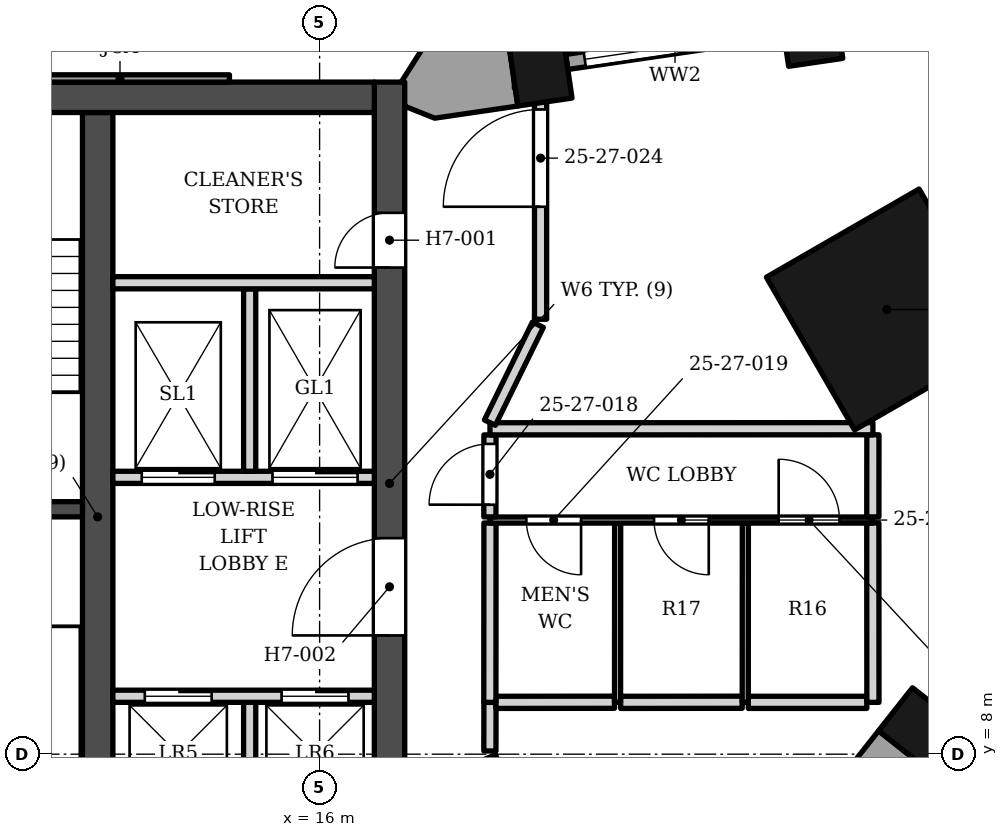
"""IFC4 building model, lengths in metres.
Left out: names, types, materials, properties, quantities, classifications, styles, units other than length and angle.
Written with IfcOpenShell. Run it as: python <this file> out.ifc"""

import sys

from ifc_helpers import new_model, si_unit, direction, frame, frame_2d, origin, origin_2d, place, context, subcontext, project, spatial, polyline, rectangle, outline, extrude, element, fill, save


model = new_model("IFC4")
c1 = context("Model", 3, precision=1e-05, world=origin(), true_north=direction((0.0, 1.0)))
c2 = subcontext(c1, "Body", "Model", "MODEL_VIEW")
j1 = project(units=[si_unit("LENGTHUNIT", "METRE"), si_unit("PLANEANGLEUNIT", "RADIAN")], contexts=[c1])
p1 = place(None, origin())
s1 = spatial("IfcSite", under=j1, at=p1, CompositionType="ELEMENT")
p2 = place(p1, origin())
s2 = spatial("IfcBuilding", under=s1, at=p2, CompositionType="ELEMENT")
p3 = place(p2, frame((0.0, 0.0, 112.2)))
s3 = spatial("IfcBuildingStorey", under=s2, at=p3, CompositionType="ELEMENT", Elevation=112.2)
p4 = place(p3, frame((-16.9, 18.802, 0.0), z_axis=(0.0, 0.0, 1.0), x_axis=(1.0, 0.0, 0.0)))
e1 = element("IfcWall", 1, at=p4, inside=s3, PredefinedType="SHEAR", context=c2, shape_type="SweptSolid", body=[
    extrude(rectangle(XDim=33.8, YDim=0.5, at=frame_2d((16.9, 0.0))), origin(), (0.0, 0.0, 1.0), 3.4),
])
p5 = place(p3, frame((12.35, 5.253, 0.0), z_axis=(0.0, 0.0, 1.0), x_axis=(0.0, 1.0, 0.0)))
e2 = element("IfcWall", 2, at=p5, inside=s3, PredefinedType="SHEAR", context=c2, shape_type="SweptSolid", body=[
    extrude(rectangle(XDim=13.3, YDim=0.5, at=frame_2d((6.65, 0.0))), origin(), (0.0, 0.0, 1.0), 3.4),
])
p6 = place(p3, frame((8.35, 12.028, 0.0), z_axis=(0.0, 0.0, 1.0), x_axis=(1.0, 0.0, 0.0)))
e3 = element("IfcWall", 3, at=p6, inside=s3, PredefinedType="SHEAR", context=c2, shape_type="SweptSolid", body=[
    extrude(rectangle(XDim=3.75, YDim=0.25, at=frame_2d((1.875, 0.0))), origin(), (0.0, 0.0, 1.0), 3.4),
])
p7 = place(p3, frame((17.15, 5.853, 0.0), z_axis=(0.0, 0.0, 1.0), x_axis=(0.0, 1.0, 0.0)))
e4 = element("IfcWall", 4, at=p7, inside=s3, PredefinedType="SHEAR", context=c2, shape_type="SweptSolid", body=[
    extrude(rectangle(XDim=13.2, YDim=0.5, at=frame_2d((6.6, 0.0))), origin(), (0.0, 0.0, 1.0), 3.4),
])
p8 = place(p7, frame((4.1, 0.0, 0.0)))
e5 = element("IfcOpeningElement", 5, at=p8, cuts=e4, PredefinedType="OPENING", context=c2, shape_type="SweptSolid", body=[
    extrude(rectangle(XDim=1.6, YDim=2.1, at=frame_2d((0.8, 1.05))), frame((0.0, 0.26, 0.0), z_axis=(0.0, -1.0, 0.0), x_axis=(1.0, 0.0, 0.0)), (0.0, 0.0, 1.0), 0.52),
])
p9 = place(p7, frame((10.15, 0.0, 0.0)))
e6 = element("IfcOpeningElement", 6, at=p9, cuts=e4, PredefinedType="OPENING", context=c2, shape_type="SweptSolid", body=[
    extrude(rectangle(XDim=0.9, YDim=2.1, at=frame_2d((0.45, 1.05))), frame((0.0, 0.26, 0.0), z_axis=(0.0, -1.0, 0.0), x_axis=(1.0, 0.0, 0.0)), (0.0, 0.0, 1.0), 0.52),
])
p10 = place(p3, frame((25.329, 15.313, 0.0), z_axis=(0.0, 0.0, 1.0), x_axis=(-0.866025377604, -0.500000045345, 0.0)))
e7 = element("IfcColumn", 7, at=p10, inside=s3, PredefinedType="COLUMN", context=c2, shape_type="SweptSolid", body=[
    extrude(rectangle(XDim=2.9, YDim=2.9, at=origin_2d()), origin(), (0.0, 0.0, 1.0), 3.4),
])
for number, where, z_axis, x_axis in (
    (8, (25.943, 8.367, 0.0), (0.0, 0.0, 1.0), (0.62, 0.784, 0.0)),
    (9, (24.072, 19.971, 0.0), (0.0, 0.0, 1.0), (-0.989, -0.145, 0.0)),
    (10, (19.619, 19.318, 0.0), (0.0, 0.0, 1.0), (-0.989, -0.145, 0.0)),
):
    element("IfcColumn", number, at=place(p3, frame(where, z_axis=z_axis, x_axis=x_axis)), inside=s3, PredefinedType="COLUMN", context=c2, shape_type="SweptSolid", body=[
        extrude(rectangle(XDim=0.9, YDim=1.2, at=origin_2d()), origin(), (0.0, 0.0, 1.0), 3.4),
    ])
p11 = place(p3, origin())
e11 = element("IfcWall", 11, at=p11, inside=s3, PredefinedType="SOLIDWALL", context=c2, shape_type="SweptSolid", body=[
    extrude(outline(polyline([(10.917, 19.173), (10.917, 19.052), (14.517, 19.052), (14.517, 19.173), (10.917, 19.173)])), origin(), (0.0, 0.0, 1.0), 2.65),
])
p12 = place(p3, frame((23.626, 19.906, 0.0), z_axis=(0.0, 0.0, 1.0), x_axis=(-0.989431656237, -0.144999991846, 0.0)))
e12 = element("IfcWall", 12, at=p12, inside=s3, PredefinedType="ELEMENTEDWALL", context=c2, shape_type="SweptSolid", body=[
    extrude(rectangle(XDim=3.6, YDim=0.25, at=frame_2d((1.8, 0.0))), origin(), (0.0, 0.0, 1.0), 2.552),
])
p13 = place(p12, frame((0.3, 0.0, 0.3)))
e13 = element("IfcOpeningElement", 13, at=p13, cuts=e12, PredefinedType="OPENING", context=c2, shape_type="SweptSolid", body=[
    extrude(rectangle(XDim=3.0, YDim=2.05, at=frame_2d((1.5, 1.025))), frame((0.0, 0.135, 0.0), z_axis=(0.0, -1.0, 0.0), x_axis=(1.0, 0.0, 0.0)), (0.0, 0.0, 1.0), 0.27),
])
p14 = place(p3, origin())
e14 = element("IfcWall", 14, at=p14, inside=s3, PredefinedType="SOLIDWALL", context=c2, shape_type="SweptSolid", body=[
    extrude(outline(polyline([(25.193, 8.384), (24.336, 7.3), (24.807, 6.928), (25.326, 6.628), (25.304, 6.59), (26.135, 7.64), (25.193, 8.384)])), origin(), (0.0, 0.0, 1.0), 2.63),
])
p15 = place(p3, origin())
e15 = element("IfcWall", 15, at=p15, inside=s3, PredefinedType="SOLIDWALL", context=c2, shape_type="SweptSolid", body=[
    extrude(outline(polyline([(17.72, 19.646), (17.342, 19.052), (17.4, 19.052), (17.4, 18.656), (17.894, 18.459), (19.261, 18.659), (19.087, 19.847), (17.72, 19.646)])), origin(), (0.0, 0.0, 1.0), 2.65),
])
p16 = place(p3, frame((14.85, 6.353, 0.0), z_axis=(0.0, 0.0, 1.0), x_axis=(0.0, 1.0, 0.0)))
e16 = element("IfcWall", 16, at=p16, inside=s3, PredefinedType="SOLIDWALL", context=c2, shape_type="SweptSolid", body=[
    extrude(rectangle(XDim=2.5, YDim=0.2, at=frame_2d((1.25, 0.0))), origin(), (0.0, 0.0, 1.0), 3.23),
])
p17 = place(p3, frame((12.6, 8.953, 0.0), z_axis=(0.0, 0.0, 1.0), x_axis=(1.0, 0.0, 0.0)))
e17 = element("IfcWall", 17, at=p17, inside=s3, PredefinedType="SOLIDWALL", context=c2, shape_type="SweptSolid", body=[
    extrude(rectangle(XDim=4.3, YDim=0.2, at=frame_2d((2.15, 0.0))), origin(), (0.0, 0.0, 1.0), 3.23),
])
p18 = place(p17, frame((0.525, 0.0, 0.0)))
e18 = element("IfcOpeningElement", 18, at=p18, cuts=e17, PredefinedType="OPENING", context=c2, shape_type="SweptSolid", body=[
    extrude(rectangle(XDim=1.1, YDim=2.1, at=frame_2d((0.55, 1.05))), frame((0.0, 0.11, 0.0), z_axis=(0.0, -1.0, 0.0), x_axis=(1.0, 0.0, 0.0)), (0.0, 0.0, 1.0), 0.22),
])
p19 = place(p17, frame((2.775, 0.0, 0.0)))
e19 = element("IfcOpeningElement", 19, at=p19, cuts=e17, PredefinedType="OPENING", context=c2, shape_type="SweptSolid", body=[
    extrude(rectangle(XDim=1.1, YDim=2.1, at=frame_2d((0.55, 1.05))), frame((0.0, 0.11, 0.0), z_axis=(0.0, -1.0, 0.0), x_axis=(1.0, 0.0, 0.0)), (0.0, 0.0, 1.0), 0.22),
])
p20 = place(p3, frame((12.6, 12.552, 0.0), z_axis=(0.0, 0.0, 1.0), x_axis=(1.0, 0.0, 0.0)))
e20 = element("IfcWall", 20, at=p20, inside=s3, PredefinedType="SOLIDWALL", context=c2, shape_type="SweptSolid", body=[
    extrude(rectangle(XDim=4.3, YDim=0.2, at=frame_2d((2.15, 0.0))), origin(), (0.0, 0.0, 1.0), 3.23),
])
p21 = place(p20, frame((0.475, 0.0, 0.0)))
e21 = element("IfcOpeningElement", 21, at=p21, cuts=e20, PredefinedType="OPENING", context=c2, shape_type="SweptSolid", body=[
    extrude(rectangle(XDim=1.2, YDim=2.1, at=frame_2d((0.6, 1.05))), frame((0.0, 0.11, 0.0), z_axis=(0.0, -1.0, 0.0), x_axis=(1.0, 0.0, 0.0)), (0.0, 0.0, 1.0), 0.22),
])
p22 = place(p20, frame((2.625, 0.0, 0.0)))
e22 = element("IfcOpeningElement", 22, at=p22, cuts=e20, PredefinedType="OPENING", context=c2, shape_type="SweptSolid", body=[
    extrude(rectangle(XDim=1.4, YDim=2.1, at=frame_2d((0.7, 1.05))), frame((0.0, 0.11, 0.0), z_axis=(0.0, -1.0, 0.0), x_axis=(1.0, 0.0, 0.0)), (0.0, 0.0, 1.0), 0.22),
])
p23 = place(p3, frame((14.85, 12.653, 0.0), z_axis=(0.0, 0.0, 1.0), x_axis=(0.0, 1.0, 0.0)))
e23 = element("IfcWall", 23, at=p23, inside=s3, PredefinedType="SOLIDWALL", context=c2, shape_type="SweptSolid", body=[
    extrude(rectangle(XDim=3.0, YDim=0.2, at=frame_2d((1.5, 0.0))), origin(), (0.0, 0.0, 1.0), 3.23),
])
p24 = place(p3, frame((12.6, 15.753, 0.0), z_axis=(0.0, 0.0, 1.0), x_axis=(1.0, 0.0, 0.0)))
e24 = element("IfcWall", 24, at=p24, inside=s3, PredefinedType="SOLIDWALL", context=c2, shape_type="SweptSolid", body=[
    extrude(rectangle(XDim=4.3, YDim=0.2, at=frame_2d((2.15, 0.0))), origin(), (0.0, 0.0, 1.0), 3.23),
])
p25 = place(p3, frame((18.801, 7.953, 0.0), z_axis=(0.0, 0.0, 1.0), x_axis=(0.381856038323, -0.924221816447, 0.0)))
e25 = element("IfcWall", 25, at=p25, inside=s3, PredefinedType="PARTITIONING", context=c2, shape_type="SweptSolid", body=[
    extrude(rectangle(XDim=1.088, YDim=0.2, at=frame_2d((0.544, 0.0))), origin(), (0.0, 0.0, 1.0), 3.23),
])
p26 = place(p3, frame((18.801, 8.053, 0.0), z_axis=(0.0, 0.0, 1.0), x_axis=(0.001527182092, 0.999998833857, 0.0)))
e26 = element("IfcWall", 26, at=p26, inside=s3, PredefinedType="PARTITIONING", context=c2, shape_type="SweptSolid", body=[
    extrude(rectangle(XDim=0.799, YDim=0.2, at=frame_2d((0.4, 0.0))), origin(), (0.0, 0.0, 1.0), 3.23),
])
p27 = place(p3, frame((18.9, 8.852, 0.0), z_axis=(0.0, 0.0, 1.0), x_axis=(0.999999615941, 0.000876423853, 0.0)))
e27 = element("IfcWall", 27, at=p27, inside=s3, PredefinedType="PARTITIONING", context=c2, shape_type="SweptSolid", body=[
    extrude(rectangle(XDim=1.95, YDim=0.2, at=frame_2d((0.975, 0.0))), origin(), (0.0, 0.0, 1.0), 3.23),
])
p28 = place(p3, frame((20.95, 8.852, 0.0), z_axis=(0.0, 0.0, 1.0), x_axis=(0.999999634833, 0.000854596196, 0.0)))
e28 = element("IfcWall", 28, at=p28, inside=s3, PredefinedType="PARTITIONING", context=c2, shape_type="SweptSolid", body=[
    extrude(rectangle(XDim=2.0, YDim=0.2, at=frame_2d((1.0, 0.0))), origin(), (0.0, 0.0, 1.0), 3.23),
])
p29 = place(p3, frame((23.05, 8.852, 0.0), z_axis=(0.0, 0.0, 1.0), x_axis=(1.0, 0.0, 0.0)))
e29 = element("IfcWall", 29, at=p29, inside=s3, PredefinedType="PARTITIONING", context=c2, shape_type="SweptSolid", body=[
    extrude(rectangle(XDim=1.95, YDim=0.2, at=frame_2d((0.975, 0.0))), origin(), (0.0, 0.0, 1.0), 3.23),
])
for number, where, z_axis, x_axis in (
    (30, (25.098, 11.802, 0.0), (0.0, 0.0, 1.0), (0.001, -1.0, 0.0)),
    (31, (18.8, 8.852, 0.0), (0.0, 0.0, 1.0), (0.001, 1.0, 0.0)),
):
    element("IfcWall", number, at=place(p3, frame(where, z_axis=z_axis, x_axis=x_axis)), inside=s3, PredefinedType="PARTITIONING", context=c2, shape_type="SweptSolid", body=[
        extrude(rectangle(XDim=2.95, YDim=0.2, at=frame_2d((1.475, 0.0))), origin(), (0.0, 0.0, 1.0), 3.23),
    ])
for number, where, z_axis, x_axis in (
    (32, (20.9, 8.852, 0.0), (0.0, 0.0, 1.0), (0.001, 1.0, 0.0)),
    (33, (23.0, 8.852, 0.0), (0.0, 0.0, 1.0), (0.001, 1.0, 0.0)),
):
    element("IfcWall", number, at=place(p3, frame(where, z_axis=z_axis, x_axis=x_axis)), inside=s3, PredefinedType="PARTITIONING", context=c2, shape_type="SweptSolid", body=[
        extrude(rectangle(XDim=2.948, YDim=0.1, at=frame_2d((1.474, 0.0))), origin(), (0.0, 0.0, 1.0), 3.23),
    ])
p30 = place(p3, frame((18.8, 11.85, 0.0), z_axis=(0.0, 0.0, 1.0), x_axis=(1.0, 0.0, 0.0)))
e34 = element("IfcWall", 34, at=p30, inside=s3, PredefinedType="PARTITIONING", context=c2, shape_type="SweptSolid", body=[
    extrude(rectangle(XDim=6.3, YDim=0.1, at=frame_2d((3.15, 0.0))), origin(), (0.0, 0.0, 1.0), 2.552),
])
p31 = place(p30, frame((0.6, 0.0, 0.0)))
e35 = element("IfcOpeningElement", 35, at=p31, cuts=e34, PredefinedType="OPENING", context=c2, shape_type="SweptSolid", body=[
    extrude(rectangle(XDim=0.9, YDim=2.1, at=frame_2d((0.45, 1.05))), frame((0.0, 0.06, 0.0), z_axis=(0.0, -1.0, 0.0), x_axis=(1.0, 0.0, 0.0)), (0.0, 0.0, 1.0), 0.12),
])
p32 = place(p30, frame((2.7, 0.0, 0.0)))
e36 = element("IfcOpeningElement", 36, at=p32, cuts=e34, PredefinedType="OPENING", context=c2, shape_type="SweptSolid", body=[
    extrude(rectangle(XDim=0.9, YDim=2.1, at=frame_2d((0.45, 1.05))), frame((0.0, 0.06, 0.0), z_axis=(0.0, -1.0, 0.0), x_axis=(1.0, 0.0, 0.0)), (0.0, 0.0, 1.0), 0.12),
])
p33 = place(p30, frame((4.75, 0.0, 0.0)))
e37 = element("IfcOpeningElement", 37, at=p33, cuts=e34, PredefinedType="OPENING", context=c2, shape_type="SweptSolid", body=[
    extrude(rectangle(XDim=1.0, YDim=2.1, at=frame_2d((0.5, 1.05))), frame((0.0, 0.06, 0.0), z_axis=(0.0, -1.0, 0.0), x_axis=(1.0, 0.0, 0.0)), (0.0, 0.0, 1.0), 0.12),
])
p34 = place(p3, frame((25.098, 11.902, 0.0), z_axis=(0.0, 0.0, 1.0), x_axis=(0.001085186556, 0.999999411185, 0.0)))
e38 = element("IfcWall", 38, at=p34, inside=s3, PredefinedType="PARTITIONING", context=c2, shape_type="SweptSolid", body=[
    extrude(rectangle(XDim=1.35, YDim=0.2, at=frame_2d((0.675, 0.0))), origin(), (0.0, 0.0, 1.0), 3.23),
])
p35 = place(p3, frame((18.8, 11.902, 0.0), z_axis=(0.0, 0.0, 1.0), x_axis=(0.001267655628, 0.999999196524, 0.0)))
e39 = element("IfcWall", 39, at=p35, inside=s3, PredefinedType="PARTITIONING", context=c2, shape_type="SweptSolid", body=[
    extrude(rectangle(XDim=1.348, YDim=0.2, at=frame_2d((0.674, 0.0))), origin(), (0.0, 0.0, 1.0), 3.23),
])
p36 = place(p35, frame((0.2, 0.0, 0.0)))
e40 = element("IfcOpeningElement", 40, at=p36, cuts=e39, PredefinedType="OPENING", context=c2, shape_type="SweptSolid", body=[
    extrude(rectangle(XDim=1.0, YDim=2.1, at=frame_2d((0.5, 1.05))), frame((0.0, 0.11, 0.0), z_axis=(0.0, -1.0, 0.0), x_axis=(1.0, 0.0, 0.0)), (0.0, 0.0, 1.0), 0.22),
])
p37 = place(p3, frame((18.802, 13.351, 0.0), z_axis=(0.0, 0.0, 1.0), x_axis=(0.999999963185, 0.000271349372, 0.0)))
e41 = element("IfcWall", 41, at=p37, inside=s3, PredefinedType="PARTITIONING", context=c2, shape_type="SweptSolid", body=[
    extrude(rectangle(XDim=6.298, YDim=0.2, at=frame_2d((3.149, 0.0))), origin(), (0.0, 0.0, 1.0), 3.23),
])
p38 = place(p3, frame((18.801, 13.452, 0.0), z_axis=(0.0, 0.0, 1.0), x_axis=(0.440230384159, 0.897884852786, 0.0)))
e42 = element("IfcWall", 42, at=p38, inside=s3, PredefinedType="PARTITIONING", context=c2, shape_type="SweptSolid", body=[
    extrude(rectangle(XDim=1.793, YDim=0.2, at=frame_2d((0.897, 0.0))), origin(), (0.0, 0.0, 1.0), 3.23),
])
p39 = place(p3, frame((19.634, 15.153, 0.0), z_axis=(0.0, 0.0, 1.0), x_axis=(0.0, 1.0, 0.0)))
e43 = element("IfcWall", 43, at=p39, inside=s3, PredefinedType="PARTITIONING", context=c2, shape_type="SweptSolid", body=[
    extrude(rectangle(XDim=3.9, YDim=0.2, at=frame_2d((1.95, 0.0))), origin(), (0.0, 0.0, 1.0), 3.23),
])
p40 = place(p39, frame((1.85, 0.0, 0.0)))
e44 = element("IfcOpeningElement", 44, at=p40, cuts=e43, PredefinedType="OPENING", context=c2, shape_type="SweptSolid", body=[
    extrude(rectangle(XDim=1.6, YDim=2.1, at=frame_2d((0.8, 1.05))), frame((0.0, 0.11, 0.0), z_axis=(0.0, -1.0, 0.0), x_axis=(1.0, 0.0, 0.0)), (0.0, 0.0, 1.0), 0.22),
])
p41 = place(p3, frame((19.203, 19.053, 0.0), z_axis=(0.0, 0.0, 1.0), x_axis=(0.999999728074, -0.000737462926, 0.0)))
e45 = element("IfcWall", 45, at=p41, inside=s3, PredefinedType="PARTITIONING", context=c2, shape_type="SweptSolid", body=[
    extrude(rectangle(XDim=0.331, YDim=0.2, at=frame_2d((0.166, 0.0))), origin(), (0.0, 0.0, 1.0), 3.23),
])
p42 = place(p13, origin())
e46 = element("IfcWindow", 46, at=p42, inside=s3, PartitioningType="SINGLE_PANEL", PredefinedType="WINDOW", context=c2, shape_type="SweptSolid", body=[
    extrude(rectangle(XDim=3.0, YDim=2.05, at=frame_2d((1.5, 1.025))), frame((0.0, 0.03, 0.0), z_axis=(0.0, -1.0, 0.0), x_axis=(1.0, 0.0, 0.0)), (0.0, 0.0, 1.0), 0.06),
])
fill(e13, e46)
p43 = place(p18, origin())
e47 = element("IfcDoor", 47, at=p43, inside=s3, OperationType="DOUBLE_DOOR_SLIDING", PredefinedType="DOOR", context=c2, shape_type="SweptSolid", body=[
    extrude(rectangle(XDim=1.1, YDim=2.1, at=frame_2d((0.55, 1.05))), frame((0.0, 0.025, 0.0), z_axis=(0.0, -1.0, 0.0), x_axis=(1.0, 0.0, 0.0)), (0.0, 0.0, 1.0), 0.05),
])
fill(e18, e47)
p44 = place(p19, origin())
e48 = element("IfcDoor", 48, at=p44, inside=s3, OperationType="DOUBLE_DOOR_SLIDING", PredefinedType="DOOR", context=c2, shape_type="SweptSolid", body=[
    extrude(rectangle(XDim=1.1, YDim=2.1, at=frame_2d((0.55, 1.05))), frame((0.0, 0.025, 0.0), z_axis=(0.0, -1.0, 0.0), x_axis=(1.0, 0.0, 0.0)), (0.0, 0.0, 1.0), 0.05),
])
fill(e19, e48)
p45 = place(p21, origin())
e49 = element("IfcDoor", 49, at=p45, inside=s3, OperationType="DOUBLE_DOOR_SLIDING", PredefinedType="DOOR", context=c2, shape_type="SweptSolid", body=[
    extrude(rectangle(XDim=1.2, YDim=2.1, at=frame_2d((0.6, 1.05))), frame((0.0, 0.025, 0.0), z_axis=(0.0, -1.0, 0.0), x_axis=(1.0, 0.0, 0.0)), (0.0, 0.0, 1.0), 0.05),
])
fill(e21, e49)
p46 = place(p22, origin())
e50 = element("IfcDoor", 50, at=p46, inside=s3, OperationType="DOUBLE_DOOR_SLIDING", PredefinedType="DOOR", context=c2, shape_type="SweptSolid", body=[
    extrude(rectangle(XDim=1.4, YDim=2.1, at=frame_2d((0.7, 1.05))), frame((0.0, 0.025, 0.0), z_axis=(0.0, -1.0, 0.0), x_axis=(1.0, 0.0, 0.0)), (0.0, 0.0, 1.0), 0.05),
])
fill(e22, e50)
p47 = place(p8, origin())
e51 = element("IfcDoor", 51, at=p47, inside=s3, OperationType="DOUBLE_DOOR_SINGLE_SWING", PredefinedType="DOOR", context=c2, shape_type="SweptSolid", body=[
    extrude(rectangle(XDim=1.6, YDim=2.1, at=frame_2d((0.8, 1.05))), frame((0.0, 0.025, 0.0), z_axis=(0.0, -1.0, 0.0), x_axis=(1.0, 0.0, 0.0)), (0.0, 0.0, 1.0), 0.05),
])
fill(e5, e51)
p48 = place(p9, origin())
e52 = element("IfcDoor", 52, at=p48, inside=s3, OperationType="SINGLE_SWING_LEFT", PredefinedType="DOOR", context=c2, shape_type="SweptSolid", body=[
    extrude(rectangle(XDim=0.9, YDim=2.1, at=frame_2d((0.45, 1.05))), frame((0.0, 0.025, 0.0), z_axis=(0.0, -1.0, 0.0), x_axis=(1.0, 0.0, 0.0)), (0.0, 0.0, 1.0), 0.05),
])
fill(e6, e52)
p49 = place(p36, origin())
e53 = element("IfcDoor", 53, at=p49, inside=s3, OperationType="SINGLE_SWING_LEFT", PredefinedType="DOOR", context=c2, shape_type="SweptSolid", body=[
    extrude(rectangle(XDim=1.0, YDim=2.1, at=frame_2d((0.5, 1.05))), frame((0.0, 0.025, 0.0), z_axis=(0.0, -1.0, 0.0), x_axis=(1.0, 0.0, 0.0)), (0.0, 0.0, 1.0), 0.05),
])
fill(e40, e53)
p50 = place(p31, origin())
e54 = element("IfcDoor", 54, at=p50, inside=s3, OperationType="SINGLE_SWING_RIGHT", PredefinedType="DOOR", context=c2, shape_type="SweptSolid", body=[
    extrude(rectangle(XDim=0.9, YDim=2.1, at=frame_2d((0.45, 1.05))), frame((0.0, 0.025, 0.0), z_axis=(0.0, -1.0, 0.0), x_axis=(1.0, 0.0, 0.0)), (0.0, 0.0, 1.0), 0.05),
])
fill(e35, e54)
p51 = place(p32, origin())
e55 = element("IfcDoor", 55, at=p51, inside=s3, OperationType="SINGLE_SWING_RIGHT", PredefinedType="DOOR", context=c2, shape_type="SweptSolid", body=[
    extrude(rectangle(XDim=0.9, YDim=2.1, at=frame_2d((0.45, 1.05))), frame((0.0, 0.025, 0.0), z_axis=(0.0, -1.0, 0.0), x_axis=(1.0, 0.0, 0.0)), (0.0, 0.0, 1.0), 0.05),
])
fill(e36, e55)
p52 = place(p33, origin())
e56 = element("IfcDoor", 56, at=p52, inside=s3, OperationType="SINGLE_SWING_LEFT", PredefinedType="DOOR", context=c2, shape_type="SweptSolid", body=[
    extrude(rectangle(XDim=1.0, YDim=2.1, at=frame_2d((0.5, 1.05))), frame((0.0, 0.025, 0.0), z_axis=(0.0, -1.0, 0.0), x_axis=(1.0, 0.0, 0.0)), (0.0, 0.0, 1.0), 0.05),
])
fill(e37, e56)
p53 = place(p40, origin())
e57 = element("IfcDoor", 57, at=p53, inside=s3, OperationType="DOUBLE_DOOR_SINGLE_SWING", PredefinedType="DOOR", context=c2, shape_type="SweptSolid", body=[
    extrude(rectangle(XDim=1.6, YDim=2.1, at=frame_2d((0.8, 1.05))), frame((0.0, 0.025, 0.0), z_axis=(0.0, -1.0, 0.0), x_axis=(1.0, 0.0, 0.0)), (0.0, 0.0, 1.0), 0.05),
])
fill(e44, e57)
save(model, sys.argv[1])
